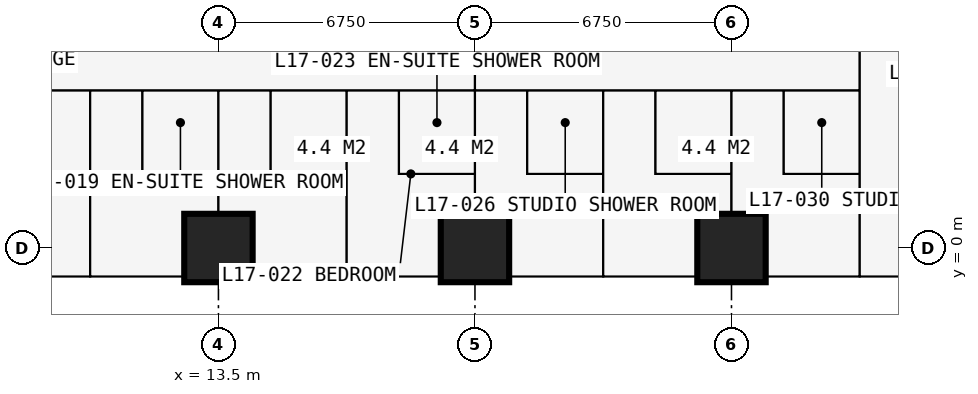
"""IFC4 building model, lengths in metres.
Left out: names, types, materials, properties, quantities, classifications, styles, units other than length and angle.
Written with IfcOpenShell. Run it as: python <this file> out.ifc"""

import sys

from ifc_helpers import new_model, si_unit, direction, frame, frame_2d, origin, origin_2d, place, context, subcontext, project, spatial, rectangle, extrude, element, fill, save


model = new_model("IFC4")
c1 = context("Model", 3, precision=1e-05, world=origin(), true_north=direction((0.0, 1.0)))
c2 = subcontext(c1, "Body", "Model", "MODEL_VIEW")
j1 = project(units=[si_unit("LENGTHUNIT", "METRE"), si_unit("PLANEANGLEUNIT", "RADIAN")], contexts=[c1])
p1 = place(None, origin())
s1 = spatial("IfcSite", under=j1, at=p1, CompositionType="ELEMENT")
p2 = place(p1, origin())
s2 = spatial("IfcBuilding", under=s1, at=p2, CompositionType="ELEMENT")
p3 = place(p2, frame((0.0, 0.0, 64.8)))
s3 = spatial("IfcBuildingStorey", under=s2, at=p3, CompositionType="ELEMENT", Elevation=64.8)
for number, where, z_axis, x_axis in (
    (1, (13.5, 0.0, 0.0), (0.0, 0.0, 1.0), (1.0, 0.0, 0.0)),
    (2, (20.25, 0.0, 0.0), (0.0, 0.0, 1.0), (1.0, 0.0, 0.0)),
    (3, (27.0, 0.0, 0.0), (0.0, 0.0, 1.0), (1.0, 0.0, 0.0)),
):
    element("IfcColumn", number, at=place(p3, frame(where, z_axis=z_axis, x_axis=x_axis)), inside=s3, PredefinedType="COLUMN", context=c2, shape_type="SweptSolid", body=[
        extrude(rectangle(XDim=1.8, YDim=1.8, at=origin_2d()), origin(), (0.0, 0.0, 1.0), 3.6),
    ])
p4 = place(p3, frame((27.0, -0.75, 0.0), z_axis=(0.0, 0.0, 1.0), x_axis=(-1.0, 0.0, 0.0)))
e4 = element("IfcWall", 4, at=p4, inside=s3, PredefinedType="SOLIDWALL", context=c2, shape_type="SweptSolid", body=[
    extrude(rectangle(XDim=6.75, YDim=0.15, at=frame_2d((3.375, 0.0))), origin(), (0.0, 0.0, 1.0), 3.375),
])
p5 = place(p4, frame((0.962, 0.0, 0.0)))
e5 = element("IfcOpeningElement", 5, at=p5, cuts=e4, PredefinedType="OPENING", context=c2, shape_type="SweptSolid", body=[
    extrude(rectangle(XDim=1.0, YDim=2.2, at=frame_2d((0.5, 1.1))), frame((0.0, 0.085, 0.0), z_axis=(0.0, -1.0, 0.0), x_axis=(1.0, 0.0, 0.0)), (0.0, 0.0, 1.0), 0.17),
])
p6 = place(p4, frame((2.025, 0.0, 0.9)))
e6 = element("IfcOpeningElement", 6, at=p6, cuts=e4, PredefinedType="OPENING", context=c2, shape_type="SweptSolid", body=[
    extrude(rectangle(XDim=1.2, YDim=1.8, at=frame_2d((0.6, 0.9))), frame((0.0, 0.085, 0.0), z_axis=(0.0, -1.0, 0.0), x_axis=(1.0, 0.0, 0.0)), (0.0, 0.0, 1.0), 0.17),
])
p7 = place(p4, frame((4.788, 0.0, 0.0)))
e7 = element("IfcOpeningElement", 7, at=p7, cuts=e4, PredefinedType="OPENING", context=c2, shape_type="SweptSolid", body=[
    extrude(rectangle(XDim=1.0, YDim=2.2, at=frame_2d((0.5, 1.1))), frame((0.0, 0.085, 0.0), z_axis=(0.0, -1.0, 0.0), x_axis=(1.0, 0.0, 0.0)), (0.0, 0.0, 1.0), 0.17),
])
p8 = place(p4, frame((3.525, 0.0, 0.9)))
e8 = element("IfcOpeningElement", 8, at=p8, cuts=e4, PredefinedType="OPENING", context=c2, shape_type="SweptSolid", body=[
    extrude(rectangle(XDim=1.2, YDim=1.8, at=frame_2d((0.6, 0.9))), frame((0.0, 0.085, 0.0), z_axis=(0.0, -1.0, 0.0), x_axis=(1.0, 0.0, 0.0)), (0.0, 0.0, 1.0), 0.17),
])
p9 = place(p3, frame((23.625, -0.85, 0.0), z_axis=(0.0, 0.0, 1.0), x_axis=(0.0, -1.0, 0.0)))
e9 = element("IfcWall", 9, at=p9, inside=s3, PredefinedType="USERDEFINED", context=c2, shape_type="SweptSolid", body=[
    extrude(rectangle(XDim=2.2, YDim=1.0, at=frame_2d((1.1, 0.0))), origin(), (0.0, 0.0, 1.0), 0.9),
])
p10 = place(p3, frame((6.75, 4.15, 0.0), z_axis=(0.0, 0.0, 1.0), x_axis=(1.0, 0.0, 0.0)))
e10 = element("IfcWall", 10, at=p10, inside=s3, PredefinedType="PARTITIONING", context=c2, shape_type="SweptSolid", body=[
    extrude(rectangle(XDim=23.625, YDim=0.1, at=frame_2d((11.812, 0.0))), origin(), (0.0, 0.0, 1.0), 3.375),
])
p11 = place(p10, frame((1.2, 0.0, 0.0)))
e11 = element("IfcOpeningElement", 11, at=p11, cuts=e10, PredefinedType="OPENING", context=c2, shape_type="SweptSolid", body=[
    extrude(rectangle(XDim=1.0, YDim=2.2, at=frame_2d((0.5, 1.1))), frame((0.0, 0.06, 0.0), z_axis=(0.0, -1.0, 0.0), x_axis=(1.0, 0.0, 0.0)), (0.0, 0.0, 1.0), 0.12),
])
p12 = place(p10, frame((3.575, 0.0, 0.0)))
e12 = element("IfcOpeningElement", 12, at=p12, cuts=e10, PredefinedType="OPENING", context=c2, shape_type="SweptSolid", body=[
    extrude(rectangle(XDim=0.95, YDim=2.2, at=frame_2d((0.475, 1.1))), frame((0.0, 0.06, 0.0), z_axis=(0.0, -1.0, 0.0), x_axis=(1.0, 0.0, 0.0)), (0.0, 0.0, 1.0), 0.12),
])
p13 = place(p10, frame((7.0, 0.0, 0.0)))
e13 = element("IfcOpeningElement", 13, at=p13, cuts=e10, PredefinedType="OPENING", context=c2, shape_type="SweptSolid", body=[
    extrude(rectangle(XDim=0.95, YDim=2.2, at=frame_2d((0.475, 1.1))), frame((0.0, 0.06, 0.0), z_axis=(0.0, -1.0, 0.0), x_axis=(1.0, 0.0, 0.0)), (0.0, 0.0, 1.0), 0.12),
])
p14 = place(p10, frame((10.375, 0.0, 0.0)))
e14 = element("IfcOpeningElement", 14, at=p14, cuts=e10, PredefinedType="OPENING", context=c2, shape_type="SweptSolid", body=[
    extrude(rectangle(XDim=0.95, YDim=2.2, at=frame_2d((0.475, 1.1))), frame((0.0, 0.06, 0.0), z_axis=(0.0, -1.0, 0.0), x_axis=(1.0, 0.0, 0.0)), (0.0, 0.0, 1.0), 0.12),
])
p15 = place(p10, frame((13.7, 0.0, 0.0)))
e15 = element("IfcOpeningElement", 15, at=p15, cuts=e10, PredefinedType="OPENING", context=c2, shape_type="SweptSolid", body=[
    extrude(rectangle(XDim=0.95, YDim=2.2, at=frame_2d((0.475, 1.1))), frame((0.0, 0.06, 0.0), z_axis=(0.0, -1.0, 0.0), x_axis=(1.0, 0.0, 0.0)), (0.0, 0.0, 1.0), 0.12),
])
p16 = place(p10, frame((17.125, 0.0, 0.0)))
e16 = element("IfcOpeningElement", 16, at=p16, cuts=e10, PredefinedType="OPENING", context=c2, shape_type="SweptSolid", body=[
    extrude(rectangle(XDim=0.95, YDim=2.2, at=frame_2d((0.475, 1.1))), frame((0.0, 0.06, 0.0), z_axis=(0.0, -1.0, 0.0), x_axis=(1.0, 0.0, 0.0)), (0.0, 0.0, 1.0), 0.12),
])
p17 = place(p10, frame((20.5, 0.0, 0.0)))
e17 = element("IfcOpeningElement", 17, at=p17, cuts=e10, PredefinedType="OPENING", context=c2, shape_type="SweptSolid", body=[
    extrude(rectangle(XDim=0.95, YDim=2.2, at=frame_2d((0.475, 1.1))), frame((0.0, 0.06, 0.0), z_axis=(0.0, -1.0, 0.0), x_axis=(1.0, 0.0, 0.0)), (0.0, 0.0, 1.0), 0.12),
])
p18 = place(p3, frame((10.125, -0.734, 0.0), z_axis=(0.0, 0.0, 1.0), x_axis=(0.0, 1.0, 0.0)))
e18 = element("IfcWall", 18, at=p18, inside=s3, PredefinedType="PARTITIONING", context=c2, shape_type="SweptSolid", body=[
    extrude(rectangle(XDim=4.884, YDim=0.15, at=frame_2d((2.442, 0.0))), origin(), (0.0, 0.0, 1.0), 3.375),
])
p19 = place(p3, frame((11.5, 1.95, 0.0), z_axis=(0.0, 0.0, 1.0), x_axis=(0.0, 1.0, 0.0)))
e19 = element("IfcWall", 19, at=p19, inside=s3, PredefinedType="PARTITIONING", context=c2, shape_type="SweptSolid", body=[
    extrude(rectangle(XDim=2.2, YDim=0.1, at=frame_2d((1.1, 0.0))), origin(), (0.0, 0.0, 1.0), 3.375),
])
p20 = place(p19, frame((0.65, 0.0, 0.0)))
e20 = element("IfcOpeningElement", 20, at=p20, cuts=e19, PredefinedType="OPENING", context=c2, shape_type="SweptSolid", body=[
    extrude(rectangle(XDim=0.9, YDim=2.2, at=frame_2d((0.45, 1.1))), frame((0.0, 0.06, 0.0), z_axis=(0.0, -1.0, 0.0), x_axis=(1.0, 0.0, 0.0)), (0.0, 0.0, 1.0), 0.12),
])
p21 = place(p3, frame((11.5, 1.95, 0.0), z_axis=(0.0, 0.0, 1.0), x_axis=(1.0, 0.0, 0.0)))
e21 = element("IfcWall", 21, at=p21, inside=s3, PredefinedType="PARTITIONING", context=c2, shape_type="SweptSolid", body=[
    extrude(rectangle(XDim=2.0, YDim=0.1, at=frame_2d((1.0, 0.0))), origin(), (0.0, 0.0, 1.0), 3.375),
])
p22 = place(p3, frame((13.5, -0.734, 0.0), z_axis=(0.0, 0.0, 1.0), x_axis=(0.0, 1.0, 0.0)))
e22 = element("IfcWall", 22, at=p22, inside=s3, PredefinedType="PARTITIONING", context=c2, shape_type="SweptSolid", body=[
    extrude(rectangle(XDim=4.884, YDim=0.175, at=frame_2d((2.442, 0.0))), origin(), (0.0, 0.0, 1.0), 2.61),
])
p23 = place(p3, frame((14.875, 1.95, 0.0), z_axis=(0.0, 0.0, 1.0), x_axis=(0.0, 1.0, 0.0)))
e23 = element("IfcWall", 23, at=p23, inside=s3, PredefinedType="PARTITIONING", context=c2, shape_type="SweptSolid", body=[
    extrude(rectangle(XDim=2.2, YDim=0.1, at=frame_2d((1.1, 0.0))), origin(), (0.0, 0.0, 1.0), 3.375),
])
p24 = place(p23, frame((0.65, 0.0, 0.0)))
e24 = element("IfcOpeningElement", 24, at=p24, cuts=e23, PredefinedType="OPENING", context=c2, shape_type="SweptSolid", body=[
    extrude(rectangle(XDim=0.9, YDim=2.2, at=frame_2d((0.45, 1.1))), frame((0.0, 0.06, 0.0), z_axis=(0.0, -1.0, 0.0), x_axis=(1.0, 0.0, 0.0)), (0.0, 0.0, 1.0), 0.12),
])
p25 = place(p3, frame((14.875, 1.95, 0.0), z_axis=(0.0, 0.0, 1.0), x_axis=(1.0, 0.0, 0.0)))
e25 = element("IfcWall", 25, at=p25, inside=s3, PredefinedType="PARTITIONING", context=c2, shape_type="SweptSolid", body=[
    extrude(rectangle(XDim=2.0, YDim=0.1, at=frame_2d((1.0, 0.0))), origin(), (0.0, 0.0, 1.0), 3.375),
])
p26 = place(p3, frame((16.875, -0.734, 0.0), z_axis=(0.0, 0.0, 1.0), x_axis=(0.0, 1.0, 0.0)))
e26 = element("IfcWall", 26, at=p26, inside=s3, PredefinedType="PARTITIONING", context=c2, shape_type="SweptSolid", body=[
    extrude(rectangle(XDim=4.884, YDim=0.175, at=frame_2d((2.442, 0.0))), origin(), (0.0, 0.0, 1.0), 3.375),
])
p27 = place(p3, frame((18.25, 1.95, 0.0), z_axis=(0.0, 0.0, 1.0), x_axis=(0.0, 1.0, 0.0)))
e27 = element("IfcWall", 27, at=p27, inside=s3, PredefinedType="PARTITIONING", context=c2, shape_type="SweptSolid", body=[
    extrude(rectangle(XDim=2.2, YDim=0.1, at=frame_2d((1.1, 0.0))), origin(), (0.0, 0.0, 1.0), 3.375),
])
p28 = place(p27, frame((0.65, 0.0, 0.0)))
e28 = element("IfcOpeningElement", 28, at=p28, cuts=e27, PredefinedType="OPENING", context=c2, shape_type="SweptSolid", body=[
    extrude(rectangle(XDim=0.9, YDim=2.2, at=frame_2d((0.45, 1.1))), frame((0.0, 0.06, 0.0), z_axis=(0.0, -1.0, 0.0), x_axis=(1.0, 0.0, 0.0)), (0.0, 0.0, 1.0), 0.12),
])
p29 = place(p3, frame((18.25, 1.95, 0.0), z_axis=(0.0, 0.0, 1.0), x_axis=(1.0, 0.0, 0.0)))
e29 = element("IfcWall", 29, at=p29, inside=s3, PredefinedType="PARTITIONING", context=c2, shape_type="SweptSolid", body=[
    extrude(rectangle(XDim=2.0, YDim=0.1, at=frame_2d((1.0, 0.0))), origin(), (0.0, 0.0, 1.0), 3.375),
])
p30 = place(p3, frame((20.25, -0.734, 0.0), z_axis=(0.0, 0.0, 1.0), x_axis=(0.0, 1.0, 0.0)))
e30 = element("IfcWall", 30, at=p30, inside=s3, PredefinedType="PARTITIONING", context=c2, shape_type="SweptSolid", body=[
    extrude(rectangle(XDim=12.034, YDim=0.15, at=frame_2d((6.017, 0.0))), origin(), (0.0, 0.0, 1.0), 2.61),
])
p31 = place(p3, frame((21.625, 1.95, 0.0), z_axis=(0.0, 0.0, 1.0), x_axis=(0.0, 1.0, 0.0)))
e31 = element("IfcWall", 31, at=p31, inside=s3, PredefinedType="PARTITIONING", context=c2, shape_type="SweptSolid", body=[
    extrude(rectangle(XDim=2.2, YDim=0.1, at=frame_2d((1.1, 0.0))), origin(), (0.0, 0.0, 1.0), 3.375),
])
p32 = place(p31, frame((0.65, 0.0, 0.0)))
e32 = element("IfcOpeningElement", 32, at=p32, cuts=e31, PredefinedType="OPENING", context=c2, shape_type="SweptSolid", body=[
    extrude(rectangle(XDim=0.9, YDim=2.2, at=frame_2d((0.45, 1.1))), frame((0.0, 0.06, 0.0), z_axis=(0.0, -1.0, 0.0), x_axis=(1.0, 0.0, 0.0)), (0.0, 0.0, 1.0), 0.12),
])
p33 = place(p3, frame((21.625, 1.95, 0.0), z_axis=(0.0, 0.0, 1.0), x_axis=(1.0, 0.0, 0.0)))
e33 = element("IfcWall", 33, at=p33, inside=s3, PredefinedType="PARTITIONING", context=c2, shape_type="SweptSolid", body=[
    extrude(rectangle(XDim=2.0, YDim=0.1, at=frame_2d((1.0, 0.0))), origin(), (0.0, 0.0, 1.0), 3.375),
])
p34 = place(p3, frame((23.625, -0.734, 0.0), z_axis=(0.0, 0.0, 1.0), x_axis=(0.0, 1.0, 0.0)))
e34 = element("IfcWall", 34, at=p34, inside=s3, PredefinedType="PARTITIONING", context=c2, shape_type="SweptSolid", body=[
    extrude(rectangle(XDim=4.884, YDim=0.175, at=frame_2d((2.442, 0.0))), origin(), (0.0, 0.0, 1.0), 3.375),
])
p35 = place(p3, frame((25.0, 1.95, 0.0), z_axis=(0.0, 0.0, 1.0), x_axis=(0.0, 1.0, 0.0)))
e35 = element("IfcWall", 35, at=p35, inside=s3, PredefinedType="PARTITIONING", context=c2, shape_type="SweptSolid", body=[
    extrude(rectangle(XDim=2.2, YDim=0.1, at=frame_2d((1.1, 0.0))), origin(), (0.0, 0.0, 1.0), 3.375),
])
p36 = place(p35, frame((0.65, 0.0, 0.0)))
e36 = element("IfcOpeningElement", 36, at=p36, cuts=e35, PredefinedType="OPENING", context=c2, shape_type="SweptSolid", body=[
    extrude(rectangle(XDim=0.9, YDim=2.2, at=frame_2d((0.45, 1.1))), frame((0.0, 0.06, 0.0), z_axis=(0.0, -1.0, 0.0), x_axis=(1.0, 0.0, 0.0)), (0.0, 0.0, 1.0), 0.12),
])
p37 = place(p3, frame((25.0, 1.95, 0.0), z_axis=(0.0, 0.0, 1.0), x_axis=(1.0, 0.0, 0.0)))
e37 = element("IfcWall", 37, at=p37, inside=s3, PredefinedType="PARTITIONING", context=c2, shape_type="SweptSolid", body=[
    extrude(rectangle(XDim=2.0, YDim=0.1, at=frame_2d((1.0, 0.0))), origin(), (0.0, 0.0, 1.0), 3.375),
])
p38 = place(p3, frame((27.0, -0.734, 0.0), z_axis=(0.0, 0.0, 1.0), x_axis=(0.0, 1.0, 0.0)))
e38 = element("IfcWall", 38, at=p38, inside=s3, PredefinedType="PARTITIONING", context=c2, shape_type="SweptSolid", body=[
    extrude(rectangle(XDim=4.884, YDim=0.175, at=frame_2d((2.442, 0.0))), origin(), (0.0, 0.0, 1.0), 2.877),
])
p39 = place(p3, frame((28.375, 1.95, 0.0), z_axis=(0.0, 0.0, 1.0), x_axis=(0.0, 1.0, 0.0)))
e39 = element("IfcWall", 39, at=p39, inside=s3, PredefinedType="PARTITIONING", context=c2, shape_type="SweptSolid", body=[
    extrude(rectangle(XDim=2.2, YDim=0.1, at=frame_2d((1.1, 0.0))), origin(), (0.0, 0.0, 1.0), 3.375),
])
p40 = place(p39, frame((0.65, 0.0, 0.0)))
e40 = element("IfcOpeningElement", 40, at=p40, cuts=e39, PredefinedType="OPENING", context=c2, shape_type="SweptSolid", body=[
    extrude(rectangle(XDim=0.9, YDim=2.2, at=frame_2d((0.45, 1.1))), frame((0.0, 0.06, 0.0), z_axis=(0.0, -1.0, 0.0), x_axis=(1.0, 0.0, 0.0)), (0.0, 0.0, 1.0), 0.12),
])
p41 = place(p3, frame((28.375, 1.95, 0.0), z_axis=(0.0, 0.0, 1.0), x_axis=(1.0, 0.0, 0.0)))
e41 = element("IfcWall", 41, at=p41, inside=s3, PredefinedType="PARTITIONING", context=c2, shape_type="SweptSolid", body=[
    extrude(rectangle(XDim=2.0, YDim=0.1, at=frame_2d((1.0, 0.0))), origin(), (0.0, 0.0, 1.0), 3.375),
])
p42 = place(p3, frame((30.375, -0.734, 0.0), z_axis=(0.0, 0.0, 1.0), x_axis=(0.0, 1.0, 0.0)))
e42 = element("IfcWall", 42, at=p42, inside=s3, PredefinedType="PARTITIONING", context=c2, shape_type="SweptSolid", body=[
    extrude(rectangle(XDim=12.034, YDim=0.15, at=frame_2d((6.017, 0.0))), origin(), (0.0, 0.0, 1.0), 3.375),
])
p43 = place(p42, frame((5.134, 0.0, 0.0)))
e43 = element("IfcOpeningElement", 43, at=p43, cuts=e42, PredefinedType="OPENING", context=c2, shape_type="SweptSolid", body=[
    extrude(rectangle(XDim=1.0, YDim=2.2, at=frame_2d((0.5, 1.1))), frame((0.0, 0.085, 0.0), z_axis=(0.0, -1.0, 0.0), x_axis=(1.0, 0.0, 0.0)), (0.0, 0.0, 1.0), 0.17),
])
p44 = place(p5, origin())
e44 = element("IfcDoor", 44, at=p44, inside=s3, OperationType="SINGLE_SWING_LEFT", PredefinedType="DOOR", context=c2, shape_type="SweptSolid", body=[
    extrude(rectangle(XDim=1.0, YDim=2.2, at=frame_2d((0.5, 1.1))), frame((0.0, 0.025, 0.0), z_axis=(0.0, -1.0, 0.0), x_axis=(1.0, 0.0, 0.0)), (0.0, 0.0, 1.0), 0.05),
])
fill(e5, e44)
p45 = place(p6, origin())
e45 = element("IfcWindow", 45, at=p45, inside=s3, PartitioningType="SINGLE_PANEL", PredefinedType="WINDOW", context=c2, shape_type="SweptSolid", body=[
    extrude(rectangle(XDim=1.2, YDim=1.8, at=frame_2d((0.6, 0.9))), frame((0.0, 0.03, 0.0), z_axis=(0.0, -1.0, 0.0), x_axis=(1.0, 0.0, 0.0)), (0.0, 0.0, 1.0), 0.06),
])
fill(e6, e45)
p46 = place(p7, origin())
e46 = element("IfcDoor", 46, at=p46, inside=s3, OperationType="SINGLE_SWING_RIGHT", PredefinedType="DOOR", context=c2, shape_type="SweptSolid", body=[
    extrude(rectangle(XDim=1.0, YDim=2.2, at=frame_2d((0.5, 1.1))), frame((0.0, 0.025, 0.0), z_axis=(0.0, -1.0, 0.0), x_axis=(1.0, 0.0, 0.0)), (0.0, 0.0, 1.0), 0.05),
])
fill(e7, e46)
p47 = place(p8, origin())
e47 = element("IfcWindow", 47, at=p47, inside=s3, PartitioningType="SINGLE_PANEL", PredefinedType="WINDOW", context=c2, shape_type="SweptSolid", body=[
    extrude(rectangle(XDim=1.2, YDim=1.8, at=frame_2d((0.6, 0.9))), frame((0.0, 0.03, 0.0), z_axis=(0.0, -1.0, 0.0), x_axis=(1.0, 0.0, 0.0)), (0.0, 0.0, 1.0), 0.06),
])
fill(e8, e47)
p48 = place(p12, origin())
e48 = element("IfcDoor", 48, at=p48, inside=s3, OperationType="SINGLE_SWING_LEFT", PredefinedType="DOOR", context=c2, shape_type="SweptSolid", body=[
    extrude(rectangle(XDim=0.95, YDim=2.2, at=frame_2d((0.475, 1.1))), frame((0.0, 0.025, 0.0), z_axis=(0.0, -1.0, 0.0), x_axis=(1.0, 0.0, 0.0)), (0.0, 0.0, 1.0), 0.05),
])
fill(e12, e48)
p49 = place(p20, origin())
e49 = element("IfcDoor", 49, at=p49, inside=s3, OperationType="SINGLE_SWING_RIGHT", PredefinedType="DOOR", context=c2, shape_type="SweptSolid", body=[
    extrude(rectangle(XDim=0.9, YDim=2.2, at=frame_2d((0.45, 1.1))), frame((0.0, 0.025, 0.0), z_axis=(0.0, -1.0, 0.0), x_axis=(1.0, 0.0, 0.0)), (0.0, 0.0, 1.0), 0.05),
])
fill(e20, e49)
p50 = place(p13, origin())
e50 = element("IfcDoor", 50, at=p50, inside=s3, OperationType="SINGLE_SWING_LEFT", PredefinedType="DOOR", context=c2, shape_type="SweptSolid", body=[
    extrude(rectangle(XDim=0.95, YDim=2.2, at=frame_2d((0.475, 1.1))), frame((0.0, 0.025, 0.0), z_axis=(0.0, -1.0, 0.0), x_axis=(1.0, 0.0, 0.0)), (0.0, 0.0, 1.0), 0.05),
])
fill(e13, e50)
p51 = place(p24, origin())
e51 = element("IfcDoor", 51, at=p51, inside=s3, OperationType="SINGLE_SWING_RIGHT", PredefinedType="DOOR", context=c2, shape_type="SweptSolid", body=[
    extrude(rectangle(XDim=0.9, YDim=2.2, at=frame_2d((0.45, 1.1))), frame((0.0, 0.025, 0.0), z_axis=(0.0, -1.0, 0.0), x_axis=(1.0, 0.0, 0.0)), (0.0, 0.0, 1.0), 0.05),
])
fill(e24, e51)
p52 = place(p14, origin())
e52 = element("IfcDoor", 52, at=p52, inside=s3, OperationType="SINGLE_SWING_LEFT", PredefinedType="DOOR", context=c2, shape_type="SweptSolid", body=[
    extrude(rectangle(XDim=0.95, YDim=2.2, at=frame_2d((0.475, 1.1))), frame((0.0, 0.025, 0.0), z_axis=(0.0, -1.0, 0.0), x_axis=(1.0, 0.0, 0.0)), (0.0, 0.0, 1.0), 0.05),
])
fill(e14, e52)
p53 = place(p28, origin())
e53 = element("IfcDoor", 53, at=p53, inside=s3, OperationType="SINGLE_SWING_RIGHT", PredefinedType="DOOR", context=c2, shape_type="SweptSolid", body=[
    extrude(rectangle(XDim=0.9, YDim=2.2, at=frame_2d((0.45, 1.1))), frame((0.0, 0.025, 0.0), z_axis=(0.0, -1.0, 0.0), x_axis=(1.0, 0.0, 0.0)), (0.0, 0.0, 1.0), 0.05),
])
fill(e28, e53)
p54 = place(p15, origin())
e54 = element("IfcDoor", 54, at=p54, inside=s3, OperationType="SINGLE_SWING_LEFT", PredefinedType="DOOR", context=c2, shape_type="SweptSolid", body=[
    extrude(rectangle(XDim=0.95, YDim=2.2, at=frame_2d((0.475, 1.1))), frame((0.0, 0.025, 0.0), z_axis=(0.0, -1.0, 0.0), x_axis=(1.0, 0.0, 0.0)), (0.0, 0.0, 1.0), 0.05),
])
fill(e15, e54)
p55 = place(p32, origin())
e55 = element("IfcDoor", 55, at=p55, inside=s3, OperationType="SINGLE_SWING_RIGHT", PredefinedType="DOOR", context=c2, shape_type="SweptSolid", body=[
    extrude(rectangle(XDim=0.9, YDim=2.2, at=frame_2d((0.45, 1.1))), frame((0.0, 0.025, 0.0), z_axis=(0.0, -1.0, 0.0), x_axis=(1.0, 0.0, 0.0)), (0.0, 0.0, 1.0), 0.05),
])
fill(e32, e55)
p56 = place(p16, origin())
e56 = element("IfcDoor", 56, at=p56, inside=s3, OperationType="SINGLE_SWING_LEFT", PredefinedType="DOOR", context=c2, shape_type="SweptSolid", body=[
    extrude(rectangle(XDim=0.95, YDim=2.2, at=frame_2d((0.475, 1.1))), frame((0.0, 0.025, 0.0), z_axis=(0.0, -1.0, 0.0), x_axis=(1.0, 0.0, 0.0)), (0.0, 0.0, 1.0), 0.05),
])
fill(e16, e56)
p57 = place(p36, origin())
e57 = element("IfcDoor", 57, at=p57, inside=s3, OperationType="SINGLE_SWING_RIGHT", PredefinedType="DOOR", context=c2, shape_type="SweptSolid", body=[
    extrude(rectangle(XDim=0.9, YDim=2.2, at=frame_2d((0.45, 1.1))), frame((0.0, 0.025, 0.0), z_axis=(0.0, -1.0, 0.0), x_axis=(1.0, 0.0, 0.0)), (0.0, 0.0, 1.0), 0.05),
])
fill(e36, e57)
p58 = place(p17, origin())
e58 = element("IfcDoor", 58, at=p58, inside=s3, OperationType="SINGLE_SWING_LEFT", PredefinedType="DOOR", context=c2, shape_type="SweptSolid", body=[
    extrude(rectangle(XDim=0.95, YDim=2.2, at=frame_2d((0.475, 1.1))), frame((0.0, 0.025, 0.0), z_axis=(0.0, -1.0, 0.0), x_axis=(1.0, 0.0, 0.0)), (0.0, 0.0, 1.0), 0.05),
])
fill(e17, e58)
p59 = place(p40, origin())
e59 = element("IfcDoor", 59, at=p59, inside=s3, OperationType="SINGLE_SWING_RIGHT", PredefinedType="DOOR", context=c2, shape_type="SweptSolid", body=[
    extrude(rectangle(XDim=0.9, YDim=2.2, at=frame_2d((0.45, 1.1))), frame((0.0, 0.025, 0.0), z_axis=(0.0, -1.0, 0.0), x_axis=(1.0, 0.0, 0.0)), (0.0, 0.0, 1.0), 0.05),
])
fill(e40, e59)
p60 = place(p43, origin())
e60 = element("IfcDoor", 60, at=p60, inside=s3, OperationType="SINGLE_SWING_LEFT", PredefinedType="DOOR", context=c2, shape_type="SweptSolid", body=[
    extrude(rectangle(XDim=1.0, YDim=2.2, at=frame_2d((0.5, 1.1))), frame((0.0, 0.025, 0.0), z_axis=(0.0, -1.0, 0.0), x_axis=(1.0, 0.0, 0.0)), (0.0, 0.0, 1.0), 0.05),
])
fill(e43, e60)
save(model, sys.argv[1])
